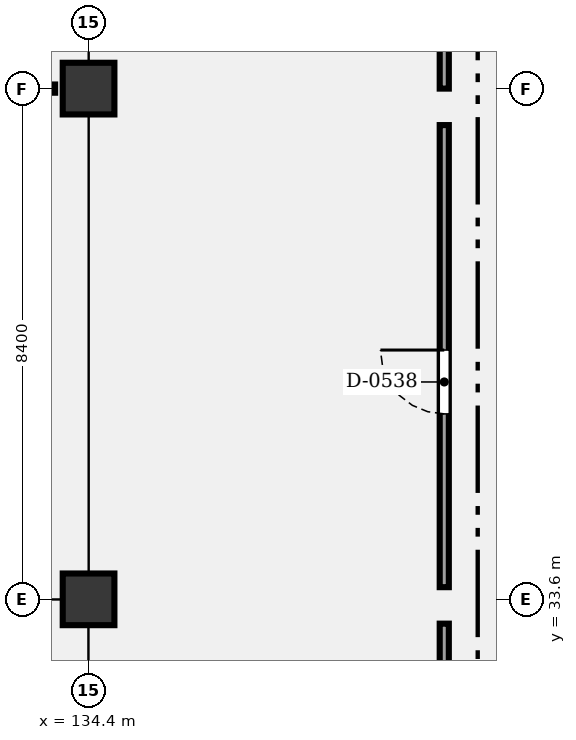
"""IFC4 building model, lengths in metres.
Left out: names, types, materials, properties, quantities, classifications, styles, units other than length and angle.
Written with IfcOpenShell. Run it as: python <this file> out.ifc"""

import sys

from ifc_helpers import new_model, si_unit, direction, frame, frame_2d, origin, origin_2d, place, context, subcontext, project, spatial, rectangle, extrude, element, fill, save


model = new_model("IFC4")
c1 = context("Model", 3, precision=1e-05, world=origin(), true_north=direction((0.0, 1.0)))
c2 = subcontext(c1, "Body", "Model", "MODEL_VIEW")
j1 = project(units=[si_unit("LENGTHUNIT", "METRE"), si_unit("PLANEANGLEUNIT", "RADIAN")], contexts=[c1])
p1 = place(None, origin())
s1 = spatial("IfcSite", under=j1, at=p1, CompositionType="ELEMENT")
p2 = place(p1, origin())
s2 = spatial("IfcBuilding", under=s1, at=p2, CompositionType="ELEMENT")
p3 = place(p2, origin())
s3 = spatial("IfcBuildingStorey", under=s2, at=p3, CompositionType="ELEMENT", Elevation=0.0)
for number, where, z_axis, x_axis in (
    (1, (134.4, 33.6, -0.35), (0.0, 0.0, 1.0), (1.0, 0.0, 0.0)),
    (2, (134.4, 42.0, -0.35), (0.0, 0.0, 1.0), (1.0, 0.0, 0.0)),
):
    element("IfcColumn", number, at=place(p3, frame(where, z_axis=z_axis, x_axis=x_axis)), inside=s3, PredefinedType="COLUMN", context=c2, shape_type="SweptSolid", body=[
        extrude(rectangle(XDim=0.85, YDim=0.85, at=origin_2d()), origin(), (0.0, 0.0, 1.0), 5.45),
    ])
p4 = place(p3, frame((124.95, 42.0, 0.0), z_axis=(0.0, 0.0, 1.0), x_axis=(1.0, 0.0, 0.0)))
e3 = element("IfcWall", 3, at=p4, inside=s3, PredefinedType="PARTITIONING", context=c2, shape_type="SweptSolid", body=[
    extrude(rectangle(XDim=8.9, YDim=0.135, at=frame_2d((4.45, 0.0))), origin(), (0.0, 0.0, 1.0), 3.98),
])
p5 = place(p3, frame((140.25, 25.6, 0.0), z_axis=(0.0, 0.0, 1.0), x_axis=(0.0, 1.0, 0.0)))
e4 = element("IfcWall", 4, at=p5, inside=s3, PredefinedType="PARTITIONING", context=c2, shape_type="SweptSolid", body=[
    extrude(rectangle(XDim=7.6, YDim=0.15, at=frame_2d((3.8, 0.0))), origin(), (0.0, 0.0, 1.0), 3.98),
])
p6 = place(p5, frame((3.2, 0.0, 0.0)))
e5 = element("IfcOpeningElement", 5, at=p6, cuts=e4, PredefinedType="OPENING", context=c2, shape_type="SweptSolid", body=[
    extrude(rectangle(XDim=1.05, YDim=2.1, at=frame_2d((0.525, 1.05))), frame((0.0, 0.085, 0.0), z_axis=(0.0, -1.0, 0.0), x_axis=(1.0, 0.0, 0.0)), (0.0, 0.0, 1.0), 0.17),
])
p7 = place(p3, frame((140.25, 33.8, 0.0), z_axis=(0.0, 0.0, 1.0), x_axis=(0.0, 1.0, 0.0)))
e6 = element("IfcWall", 6, at=p7, inside=s3, PredefinedType="PARTITIONING", context=c2, shape_type="SweptSolid", body=[
    extrude(rectangle(XDim=7.6, YDim=0.15, at=frame_2d((3.8, 0.0))), origin(), (0.0, 0.0, 1.0), 3.98),
])
p8 = place(p7, frame((2.85, 0.0, 0.0)))
e7 = element("IfcOpeningElement", 7, at=p8, cuts=e6, PredefinedType="OPENING", context=c2, shape_type="SweptSolid", body=[
    extrude(rectangle(XDim=1.05, YDim=2.1, at=frame_2d((0.525, 1.05))), frame((0.0, 0.085, 0.0), z_axis=(0.0, -1.0, 0.0), x_axis=(1.0, 0.0, 0.0)), (0.0, 0.0, 1.0), 0.17),
])
p9 = place(p3, frame((140.25, 42.0, 0.0), z_axis=(0.0, 0.0, 1.0), x_axis=(0.0, 1.0, 0.0)))
e8 = element("IfcWall", 8, at=p9, inside=s3, PredefinedType="PARTITIONING", context=c2, shape_type="SweptSolid", body=[
    extrude(rectangle(XDim=7.6, YDim=0.15, at=frame_2d((3.8, 0.0))), origin(), (0.0, 0.0, 1.0), 3.98),
])
p10 = place(p9, frame((2.85, 0.0, 0.0)))
e9 = element("IfcOpeningElement", 9, at=p10, cuts=e8, PredefinedType="OPENING", context=c2, shape_type="SweptSolid", body=[
    extrude(rectangle(XDim=1.05, YDim=2.1, at=frame_2d((0.525, 1.05))), frame((0.0, 0.085, 0.0), z_axis=(0.0, -1.0, 0.0), x_axis=(1.0, 0.0, 0.0)), (0.0, 0.0, 1.0), 0.17),
])
p11 = place(p8, origin())
e10 = element("IfcDoor", 10, at=p11, inside=s3, OperationType="SINGLE_SWING_RIGHT", PredefinedType="DOOR", context=c2, shape_type="SweptSolid", body=[
    extrude(rectangle(XDim=1.05, YDim=2.1, at=frame_2d((0.525, 1.05))), frame((0.0, 0.025, 0.0), z_axis=(0.0, -1.0, 0.0), x_axis=(1.0, 0.0, 0.0)), (0.0, 0.0, 1.0), 0.05),
])
fill(e7, e10)
save(model, sys.argv[1])
